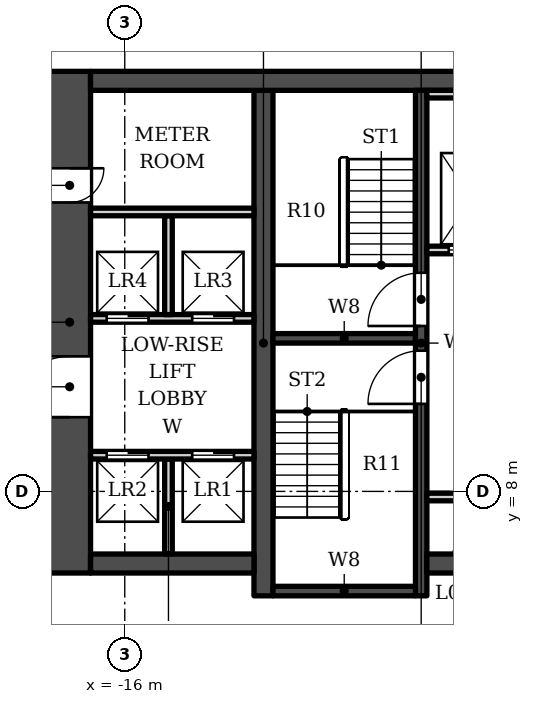
"""IFC4 building model, lengths in metres.
Left out: names, types, materials, properties, quantities, classifications, styles, units other than length and angle.
Written with IfcOpenShell. Run it as: python <this file> out.ifc"""

import sys

from ifc_helpers import new_model, si_unit, direction, frame, frame_2d, origin, place, context, subcontext, project, spatial, rectangle, extrude, element, fill, save


model = new_model("IFC4")
c1 = context("Model", 3, precision=1e-05, world=origin(), true_north=direction((0.0, 1.0)))
c2 = subcontext(c1, "Body", "Model", "MODEL_VIEW")
j1 = project(units=[si_unit("LENGTHUNIT", "METRE"), si_unit("PLANEANGLEUNIT", "RADIAN")], contexts=[c1])
p1 = place(None, origin())
s1 = spatial("IfcSite", under=j1, at=p1, CompositionType="ELEMENT")
p2 = place(p1, origin())
s2 = spatial("IfcBuilding", under=s1, at=p2, CompositionType="ELEMENT")
p3 = place(p2, frame((0.0, 0.0, 9.0)))
s3 = spatial("IfcBuildingStorey", under=s2, at=p3, CompositionType="ELEMENT", Elevation=9.0)
p4 = place(p3, frame((-16.9, 18.802, 0.0), z_axis=(0.0, 0.0, 1.0), x_axis=(1.0, 0.0, 0.0)))
e1 = element("IfcWall", 1, at=p4, inside=s3, PredefinedType="SHEAR", context=c2, shape_type="SweptSolid", body=[
    extrude(rectangle(XDim=33.8, YDim=0.5, at=frame_2d((16.9, 0.0))), origin(), (0.0, 0.0, 1.0), 11.0),
])
p5 = place(p3, frame((-12.35, 5.253, 0.0), z_axis=(0.0, 0.0, 1.0), x_axis=(0.0, 1.0, 0.0)))
e2 = element("IfcWall", 2, at=p5, inside=s3, PredefinedType="SHEAR", context=c2, shape_type="SweptSolid", body=[
    extrude(rectangle(XDim=13.3, YDim=0.5, at=frame_2d((6.65, 0.0))), origin(), (0.0, 0.0, 1.0), 11.0),
])
p6 = place(p3, frame((-8.2, 5.253, 0.0), z_axis=(0.0, 0.0, 1.0), x_axis=(0.0, 1.0, 0.0)))
e3 = element("IfcWall", 3, at=p6, inside=s3, PredefinedType="SHEAR", context=c2, shape_type="SweptSolid", body=[
    extrude(rectangle(XDim=13.3, YDim=0.3, at=frame_2d((6.65, 0.0))), origin(), (0.0, 0.0, 1.0), 11.0),
])
p7 = place(p6, frame((7.1, 0.0, 0.0)))
e4 = element("IfcOpeningElement", 4, at=p7, cuts=e3, PredefinedType="OPENING", context=c2, shape_type="SweptSolid", body=[
    extrude(rectangle(XDim=1.4, YDim=2.1, at=frame_2d((0.7, 1.05))), frame((0.0, 0.16, 0.0), z_axis=(0.0, -1.0, 0.0), x_axis=(1.0, 0.0, 0.0)), (0.0, 0.0, 1.0), 0.32),
])
p8 = place(p6, frame((5.05, 0.0, 0.0)))
e5 = element("IfcOpeningElement", 5, at=p8, cuts=e3, PredefinedType="OPENING", context=c2, shape_type="SweptSolid", body=[
    extrude(rectangle(XDim=1.4, YDim=2.1, at=frame_2d((0.7, 1.05))), frame((0.0, 0.16, 0.0), z_axis=(0.0, -1.0, 0.0), x_axis=(1.0, 0.0, 0.0)), (0.0, 0.0, 1.0), 0.32),
])
for number, where, z_axis, x_axis in (
    (6, (-12.1, 12.028, 0.0), (0.0, 0.0, 1.0), (1.0, 0.0, 0.0)),
    (7, (-12.1, 5.378, 0.0), (0.0, 0.0, 1.0), (1.0, 0.0, 0.0)),
):
    element("IfcWall", number, at=place(p3, frame(where, z_axis=z_axis, x_axis=x_axis)), inside=s3, PredefinedType="SHEAR", context=c2, shape_type="SweptSolid", body=[
        extrude(rectangle(XDim=3.75, YDim=0.25, at=frame_2d((1.875, 0.0))), origin(), (0.0, 0.0, 1.0), 11.0),
    ])
p9 = place(p3, frame((-8.05, 6.103, 0.0), z_axis=(0.0, 0.0, 1.0), x_axis=(1.0, 0.0, 0.0)))
e8 = element("IfcWall", 8, at=p9, inside=s3, PredefinedType="SHEAR", context=c2, shape_type="SweptSolid", body=[
    extrude(rectangle(XDim=7.05, YDim=0.5, at=frame_2d((3.525, 0.0))), origin(), (0.0, 0.0, 1.0), 11.0),
])
p10 = place(p9, frame((0.825, 0.0, 0.0)))
e9 = element("IfcOpeningElement", 9, at=p10, cuts=e8, PredefinedType="OPENING", context=c2, shape_type="SweptSolid", body=[
    extrude(rectangle(XDim=0.9, YDim=2.1, at=frame_2d((0.45, 1.05))), frame((0.0, 0.26, 0.0), z_axis=(0.0, -1.0, 0.0), x_axis=(1.0, 0.0, 0.0)), (0.0, 0.0, 1.0), 0.52),
])
p11 = place(p3, frame((-12.6, 6.103, 0.0), z_axis=(0.0, 0.0, 1.0), x_axis=(-1.0, 0.0, 0.0)))
e10 = element("IfcWall", 10, at=p11, inside=s3, PredefinedType="SHEAR", context=c2, shape_type="SweptSolid", body=[
    extrude(rectangle(XDim=4.3, YDim=0.5, at=frame_2d((2.15, 0.0))), origin(), (0.0, 0.0, 1.0), 11.0),
])
p12 = place(p3, frame((-17.45, 5.853, 0.0), z_axis=(0.0, 0.0, 1.0), x_axis=(0.0, 1.0, 0.0)))
e11 = element("IfcWall", 11, at=p12, inside=s3, PredefinedType="SHEAR", context=c2, shape_type="SweptSolid", body=[
    extrude(rectangle(XDim=13.2, YDim=1.1, at=frame_2d((6.6, 0.0))), origin(), (0.0, 0.0, 1.0), 11.0),
])
p13 = place(p12, frame((4.1, 0.0, 0.0)))
e12 = element("IfcOpeningElement", 12, at=p13, cuts=e11, PredefinedType="OPENING", context=c2, shape_type="SweptSolid", body=[
    extrude(rectangle(XDim=1.6, YDim=2.1, at=frame_2d((0.8, 1.05))), frame((0.0, 0.56, 0.0), z_axis=(0.0, -1.0, 0.0), x_axis=(1.0, 0.0, 0.0)), (0.0, 0.0, 1.0), 1.12),
])
p14 = place(p12, frame((9.75, 0.0, 0.0)))
e13 = element("IfcOpeningElement", 13, at=p14, cuts=e11, PredefinedType="OPENING", context=c2, shape_type="SweptSolid", body=[
    extrude(rectangle(XDim=0.9, YDim=2.1, at=frame_2d((0.45, 1.05))), frame((0.0, 0.56, 0.0), z_axis=(0.0, -1.0, 0.0), x_axis=(1.0, 0.0, 0.0)), (0.0, 0.0, 1.0), 1.12),
])
for number, where, z_axis, x_axis in (
    (14, (-14.85, 6.353, 0.0), (0.0, 0.0, 1.0), (0.0, 1.0, 0.0)),
    (15, (-8.05, 7.853, 0.0), (0.0, 0.0, 1.0), (1.0, 0.0, 0.0)),
):
    element("IfcWall", number, at=place(p3, frame(where, z_axis=z_axis, x_axis=x_axis)), inside=s3, PredefinedType="SOLIDWALL", context=c2, shape_type="SweptSolid", body=[
        extrude(rectangle(XDim=2.5, YDim=0.2, at=frame_2d((1.25, 0.0))), origin(), (0.0, 0.0, 1.0), 10.5),
    ])
p15 = place(p3, frame((-16.9, 8.953, 0.0), z_axis=(0.0, 0.0, 1.0), x_axis=(1.0, 0.0, 0.0)))
e16 = element("IfcWall", 16, at=p15, inside=s3, PredefinedType="SOLIDWALL", context=c2, shape_type="SweptSolid", body=[
    extrude(rectangle(XDim=4.3, YDim=0.2, at=frame_2d((2.15, 0.0))), origin(), (0.0, 0.0, 1.0), 10.5),
])
p16 = place(p15, frame((2.675, 0.0, 0.0)))
e17 = element("IfcOpeningElement", 17, at=p16, cuts=e16, PredefinedType="OPENING", context=c2, shape_type="SweptSolid", body=[
    extrude(rectangle(XDim=1.1, YDim=2.1, at=frame_2d((0.55, 1.05))), frame((0.0, 0.11, 0.0), z_axis=(0.0, -1.0, 0.0), x_axis=(1.0, 0.0, 0.0)), (0.0, 0.0, 1.0), 0.22),
])
p17 = place(p15, frame((0.425, 0.0, 0.0)))
e18 = element("IfcOpeningElement", 18, at=p17, cuts=e16, PredefinedType="OPENING", context=c2, shape_type="SweptSolid", body=[
    extrude(rectangle(XDim=1.1, YDim=2.1, at=frame_2d((0.55, 1.05))), frame((0.0, 0.11, 0.0), z_axis=(0.0, -1.0, 0.0), x_axis=(1.0, 0.0, 0.0)), (0.0, 0.0, 1.0), 0.22),
])
p18 = place(p3, frame((-16.9, 12.552, 0.0), z_axis=(0.0, 0.0, 1.0), x_axis=(1.0, 0.0, 0.0)))
e19 = element("IfcWall", 19, at=p18, inside=s3, PredefinedType="SOLIDWALL", context=c2, shape_type="SweptSolid", body=[
    extrude(rectangle(XDim=4.3, YDim=0.2, at=frame_2d((2.15, 0.0))), origin(), (0.0, 0.0, 1.0), 10.5),
])
p19 = place(p18, frame((2.675, 0.0, 0.0)))
e20 = element("IfcOpeningElement", 20, at=p19, cuts=e19, PredefinedType="OPENING", context=c2, shape_type="SweptSolid", body=[
    extrude(rectangle(XDim=1.1, YDim=2.1, at=frame_2d((0.55, 1.05))), frame((0.0, 0.11, 0.0), z_axis=(0.0, -1.0, 0.0), x_axis=(1.0, 0.0, 0.0)), (0.0, 0.0, 1.0), 0.22),
])
p20 = place(p18, frame((0.425, 0.0, 0.0)))
e21 = element("IfcOpeningElement", 21, at=p20, cuts=e19, PredefinedType="OPENING", context=c2, shape_type="SweptSolid", body=[
    extrude(rectangle(XDim=1.1, YDim=2.1, at=frame_2d((0.55, 1.05))), frame((0.0, 0.11, 0.0), z_axis=(0.0, -1.0, 0.0), x_axis=(1.0, 0.0, 0.0)), (0.0, 0.0, 1.0), 0.22),
])
p21 = place(p3, frame((-14.85, 12.653, 0.0), z_axis=(0.0, 0.0, 1.0), x_axis=(0.0, 1.0, 0.0)))
e22 = element("IfcWall", 22, at=p21, inside=s3, PredefinedType="SOLIDWALL", context=c2, shape_type="SweptSolid", body=[
    extrude(rectangle(XDim=2.6, YDim=0.2, at=frame_2d((1.3, 0.0))), origin(), (0.0, 0.0, 1.0), 10.5),
])
p22 = place(p3, frame((-8.05, 14.353, 0.0), z_axis=(0.0, 0.0, 1.0), x_axis=(1.0, 0.0, 0.0)))
e23 = element("IfcWall", 23, at=p22, inside=s3, PredefinedType="SOLIDWALL", context=c2, shape_type="SweptSolid", body=[
    extrude(rectangle(XDim=2.35, YDim=0.2, at=frame_2d((1.175, 0.0))), origin(), (0.0, 0.0, 1.0), 10.5),
])
p23 = place(p22, frame((0.575, 0.0, 0.0)))
e24 = element("IfcOpeningElement", 24, at=p23, cuts=e23, PredefinedType="OPENING", context=c2, shape_type="SweptSolid", body=[
    extrude(rectangle(XDim=1.2, YDim=2.1, at=frame_2d((0.6, 1.05))), frame((0.0, 0.11, 0.0), z_axis=(0.0, -1.0, 0.0), x_axis=(1.0, 0.0, 0.0)), (0.0, 0.0, 1.0), 0.22),
])
p24 = place(p3, frame((-16.9, 15.353, 0.0), z_axis=(0.0, 0.0, 1.0), x_axis=(1.0, 0.0, 0.0)))
e25 = element("IfcWall", 25, at=p24, inside=s3, PredefinedType="SOLIDWALL", context=c2, shape_type="SweptSolid", body=[
    extrude(rectangle(XDim=4.3, YDim=0.2, at=frame_2d((2.15, 0.0))), origin(), (0.0, 0.0, 1.0), 10.5),
])
p25 = place(p3, frame((-8.05, 18.453, 0.0), z_axis=(0.0, 0.0, 1.0), x_axis=(1.0, 0.0, 0.0)))
e26 = element("IfcWall", 26, at=p25, inside=s3, PredefinedType="SOLIDWALL", context=c2, shape_type="SweptSolid", body=[
    extrude(rectangle(XDim=2.35, YDim=0.2, at=frame_2d((1.175, 0.0))), origin(), (0.0, 0.0, 1.0), 10.5),
])
p26 = place(p23, origin())
e27 = element("IfcDoor", 27, at=p26, inside=s3, OperationType="DOUBLE_DOOR_SLIDING", PredefinedType="DOOR", context=c2, shape_type="SweptSolid", body=[
    extrude(rectangle(XDim=1.2, YDim=2.1, at=frame_2d((0.6, 1.05))), frame((0.0, 0.025, 0.0), z_axis=(0.0, -1.0, 0.0), x_axis=(1.0, 0.0, 0.0)), (0.0, 0.0, 1.0), 0.05),
])
fill(e24, e27)
p27 = place(p16, origin())
e28 = element("IfcDoor", 28, at=p27, inside=s3, OperationType="DOUBLE_DOOR_SLIDING", PredefinedType="DOOR", context=c2, shape_type="SweptSolid", body=[
    extrude(rectangle(XDim=1.1, YDim=2.1, at=frame_2d((0.55, 1.05))), frame((0.0, 0.025, 0.0), z_axis=(0.0, -1.0, 0.0), x_axis=(1.0, 0.0, 0.0)), (0.0, 0.0, 1.0), 0.05),
])
fill(e17, e28)
p28 = place(p19, origin())
e29 = element("IfcDoor", 29, at=p28, inside=s3, OperationType="DOUBLE_DOOR_SLIDING", PredefinedType="DOOR", context=c2, shape_type="SweptSolid", body=[
    extrude(rectangle(XDim=1.1, YDim=2.1, at=frame_2d((0.55, 1.05))), frame((0.0, 0.025, 0.0), z_axis=(0.0, -1.0, 0.0), x_axis=(1.0, 0.0, 0.0)), (0.0, 0.0, 1.0), 0.05),
])
fill(e20, e29)
p29 = place(p17, origin())
e30 = element("IfcDoor", 30, at=p29, inside=s3, OperationType="DOUBLE_DOOR_SLIDING", PredefinedType="DOOR", context=c2, shape_type="SweptSolid", body=[
    extrude(rectangle(XDim=1.1, YDim=2.1, at=frame_2d((0.55, 1.05))), frame((0.0, 0.025, 0.0), z_axis=(0.0, -1.0, 0.0), x_axis=(1.0, 0.0, 0.0)), (0.0, 0.0, 1.0), 0.05),
])
fill(e18, e30)
p30 = place(p20, origin())
e31 = element("IfcDoor", 31, at=p30, inside=s3, OperationType="DOUBLE_DOOR_SLIDING", PredefinedType="DOOR", context=c2, shape_type="SweptSolid", body=[
    extrude(rectangle(XDim=1.1, YDim=2.1, at=frame_2d((0.55, 1.05))), frame((0.0, 0.025, 0.0), z_axis=(0.0, -1.0, 0.0), x_axis=(1.0, 0.0, 0.0)), (0.0, 0.0, 1.0), 0.05),
])
fill(e21, e31)
p31 = place(p7, origin())
e32 = element("IfcDoor", 32, at=p31, inside=s3, OperationType="SINGLE_SWING_LEFT", PredefinedType="DOOR", context=c2, shape_type="SweptSolid", body=[
    extrude(rectangle(XDim=1.4, YDim=2.1, at=frame_2d((0.7, 1.05))), frame((0.0, 0.025, 0.0), z_axis=(0.0, -1.0, 0.0), x_axis=(1.0, 0.0, 0.0)), (0.0, 0.0, 1.0), 0.05),
])
fill(e4, e32)
p32 = place(p8, origin())
e33 = element("IfcDoor", 33, at=p32, inside=s3, OperationType="SINGLE_SWING_LEFT", PredefinedType="DOOR", context=c2, shape_type="SweptSolid", body=[
    extrude(rectangle(XDim=1.4, YDim=2.1, at=frame_2d((0.7, 1.05))), frame((0.0, 0.025, 0.0), z_axis=(0.0, -1.0, 0.0), x_axis=(1.0, 0.0, 0.0)), (0.0, 0.0, 1.0), 0.05),
])
fill(e5, e33)
p33 = place(p13, origin())
e34 = element("IfcDoor", 34, at=p33, inside=s3, OperationType="DOUBLE_DOOR_SINGLE_SWING", PredefinedType="DOOR", context=c2, shape_type="SweptSolid", body=[
    extrude(rectangle(XDim=1.6, YDim=2.1, at=frame_2d((0.8, 1.05))), frame((0.0, -0.225, 0.0), z_axis=(0.0, -1.0, 0.0), x_axis=(1.0, 0.0, 0.0)), (0.0, 0.0, 1.0), 0.05),
])
fill(e12, e34)
p34 = place(p14, origin())
e35 = element("IfcDoor", 35, at=p34, inside=s3, OperationType="SINGLE_SWING_RIGHT", PredefinedType="DOOR", context=c2, shape_type="SweptSolid", body=[
    extrude(rectangle(XDim=0.9, YDim=2.1, at=frame_2d((0.45, 1.05))), frame((0.0, -0.225, 0.0), z_axis=(0.0, -1.0, 0.0), x_axis=(1.0, 0.0, 0.0)), (0.0, 0.0, 1.0), 0.05),
])
fill(e13, e35)
save(model, sys.argv[1])
